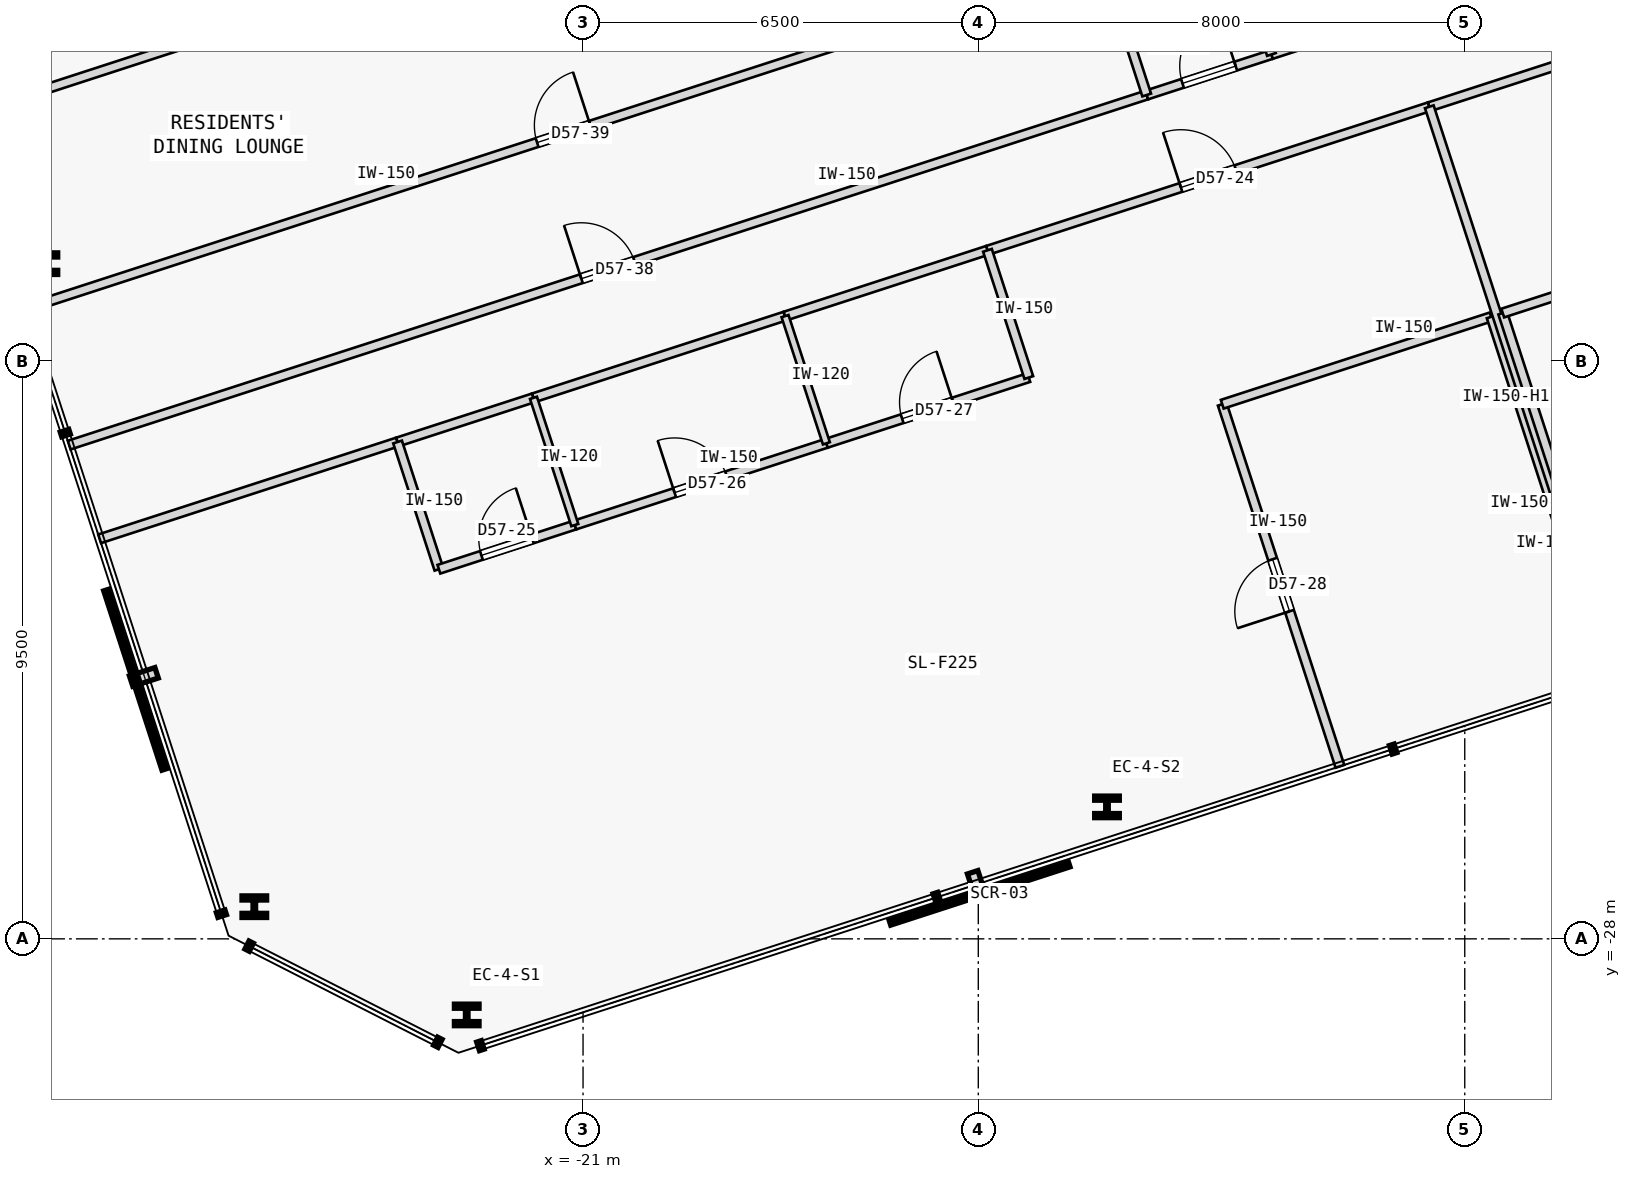
"""IFC4 building model, lengths in metres.
Left out: names, types, materials, properties, quantities, classifications, styles, units other than length and angle.
Written with IfcOpenShell. Run it as: python <this file> out.ifc"""

import sys

from ifc_helpers import new_model, si_unit, direction, frame, frame_2d, origin, origin_2d, place, context, subcontext, project, spatial, rectangle, i_section, extrude, element, fill, save


model = new_model("IFC4")
c1 = context("Model", 3, precision=1e-05, world=origin(), true_north=direction((0.0, 1.0)))
c2 = subcontext(c1, "Body", "Model", "MODEL_VIEW")
j1 = project(units=[si_unit("LENGTHUNIT", "METRE"), si_unit("PLANEANGLEUNIT", "RADIAN")], contexts=[c1])
p1 = place(None, origin())
s1 = spatial("IfcSite", under=j1, at=p1, CompositionType="ELEMENT")
p2 = place(p1, origin())
s2 = spatial("IfcBuilding", under=s1, at=p2, CompositionType="ELEMENT")
p3 = place(p2, frame((0.0, 0.0, 217.6)))
s3 = spatial("IfcBuildingStorey", under=s2, at=p3, CompositionType="ELEMENT", Elevation=217.6)
for number, where, z_axis, x_axis in (
    (1, (-22.913, -29.251, 0.0), (0.0, 0.0, 1.0), (1.0, 0.0, 0.0)),
    (2, (-12.384, -25.83, 0.0), (0.0, 0.0, 1.0), (1.0, 0.0, 0.0)),
    (3, (-29.842, -16.897, 0.0), (0.0, 0.0, 1.0), (1.0, 0.0, 0.0)),
    (4, (-26.406, -27.471, 0.0), (0.0, 0.0, 1.0), (1.0, 0.0, 0.0)),
):
    element("IfcColumn", number, at=place(p3, frame(where, z_axis=z_axis, x_axis=x_axis)), inside=s3, PredefinedType="COLUMN", context=c2, shape_type="SweptSolid", body=[
        extrude(i_section(OverallWidth=0.405, OverallDepth=0.355, WebThickness=0.042, FlangeThickness=0.068, FilletRadius=0.015, at=origin_2d()), origin(), (0.0, 0.0, 1.0), 3.35),
    ])
p4 = place(p3, frame((-28.95, -21.421, 0.0), z_axis=(0.0, 0.0, 1.0), x_axis=(0.951058442388, 0.309011066408, 0.0)))
e5 = element("IfcWall", 5, at=p4, inside=s3, PredefinedType="PARTITIONING", context=c2, shape_type="SweptSolid", body=[
    extrude(rectangle(XDim=5.152, YDim=0.15, at=frame_2d((2.576, 0.0))), origin(), (0.0, 0.0, 1.0), 3.125),
])
p5 = place(p3, frame((-14.349, -16.677, 0.0), z_axis=(0.0, 0.0, 1.0), x_axis=(0.951058958043, 0.309009479345, 0.0)))
e6 = element("IfcWall", 6, at=p5, inside=s3, PredefinedType="PARTITIONING", context=c2, shape_type="SweptSolid", body=[
    extrude(rectangle(XDim=7.64, YDim=0.15, at=frame_2d((3.82, 0.0))), origin(), (0.0, 0.0, 1.0), 3.125),
])
p6 = place(p5, frame((3.345, 0.0, 0.0)))
e7 = element("IfcOpeningElement", 7, at=p6, cuts=e6, PredefinedType="OPENING", context=c2, shape_type="SweptSolid", body=[
    extrude(rectangle(XDim=0.95, YDim=2.15, at=frame_2d((0.475, 1.075))), frame((0.0, 0.085, 0.0), z_axis=(0.0, -1.0, 0.0), x_axis=(1.0, 0.0, 0.0)), (0.0, 0.0, 1.0), 0.17),
])
p7 = place(p3, frame((-24.05, -19.829, 0.0), z_axis=(0.0, 0.0, 1.0), x_axis=(0.951035595692, 0.309081373955, 0.0)))
e8 = element("IfcWall", 8, at=p7, inside=s3, PredefinedType="PARTITIONING", context=c2, shape_type="SweptSolid", body=[
    extrude(rectangle(XDim=2.35, YDim=0.15, at=frame_2d((1.175, 0.0))), origin(), (0.0, 0.0, 1.0), 3.125),
])
p8 = place(p3, frame((-21.815, -19.103, 0.0), z_axis=(0.0, 0.0, 1.0), x_axis=(0.951057987102, 0.309012467661, 0.0)))
e9 = element("IfcWall", 9, at=p8, inside=s3, PredefinedType="PARTITIONING", context=c2, shape_type="SweptSolid", body=[
    extrude(rectangle(XDim=4.35, YDim=0.15, at=frame_2d((2.175, 0.0))), origin(), (0.0, 0.0, 1.0), 3.125),
])
p9 = place(p3, frame((-17.678, -17.759, 0.0), z_axis=(0.0, 0.0, 1.0), x_axis=(0.951055596592, 0.309019824916, 0.0)))
e10 = element("IfcWall", 10, at=p9, inside=s3, PredefinedType="PARTITIONING", context=c2, shape_type="SweptSolid", body=[
    extrude(rectangle(XDim=3.5, YDim=0.15, at=frame_2d((1.75, 0.0))), origin(), (0.0, 0.0, 1.0), 3.125),
])
p10 = place(p3, frame((-7.083, -14.316, 0.0), z_axis=(0.0, 0.0, 1.0), x_axis=(0.951054265246, 0.309023922305, 0.0)))
e11 = element("IfcWall", 11, at=p10, inside=s3, PredefinedType="PARTITIONING", context=c2, shape_type="SweptSolid", body=[
    extrude(rectangle(XDim=4.53, YDim=0.15, at=frame_2d((2.265, 0.0))), origin(), (0.0, 0.0, 1.0), 3.125),
])
p11 = place(p3, frame((-29.45, -19.881, 0.0), z_axis=(0.0, 0.0, 1.0), x_axis=(0.95105650271, 0.309017036186, 0.0)))
e12 = element("IfcWall", 12, at=p11, inside=s3, PredefinedType="PARTITIONING", context=c2, shape_type="SweptSolid", body=[
    extrude(rectangle(XDim=18.632, YDim=0.15, at=frame_2d((9.316, 0.0))), origin(), (0.0, 0.0, 1.0), 3.125),
])
p12 = place(p11, frame((8.856, 0.0, 0.0)))
e13 = element("IfcOpeningElement", 13, at=p12, cuts=e12, PredefinedType="OPENING", context=c2, shape_type="SweptSolid", body=[
    extrude(rectangle(XDim=0.92, YDim=2.15, at=frame_2d((0.46, 1.075))), frame((0.0, 0.085, 0.0), z_axis=(0.0, -1.0, 0.0), x_axis=(1.0, 0.0, 0.0)), (0.0, 0.0, 1.0), 0.17),
])
p13 = place(p3, frame((-11.73, -14.123, 0.0), z_axis=(0.0, 0.0, 1.0), x_axis=(0.951066501686, 0.308986260812, 0.0)))
e14 = element("IfcWall", 14, at=p13, inside=s3, PredefinedType="PARTITIONING", context=c2, shape_type="SweptSolid", body=[
    extrude(rectangle(XDim=2.157, YDim=0.15, at=frame_2d((1.079, 0.0))), origin(), (0.0, 0.0, 1.0), 3.125),
])
p14 = place(p13, frame((0.618, 0.0, 0.0)))
e15 = element("IfcOpeningElement", 15, at=p14, cuts=e14, PredefinedType="OPENING", context=c2, shape_type="SweptSolid", body=[
    extrude(rectangle(XDim=0.92, YDim=2.15, at=frame_2d((0.46, 1.075))), frame((0.0, 0.085, 0.0), z_axis=(0.0, -1.0, 0.0), x_axis=(1.0, 0.0, 0.0)), (0.0, 0.0, 1.0), 0.17),
])
p15 = place(p3, frame((-9.679, -13.457, 0.0), z_axis=(0.0, 0.0, 1.0), x_axis=(0.951054104561, 0.309024416831, 0.0)))
e16 = element("IfcWall", 16, at=p15, inside=s3, PredefinedType="PARTITIONING", context=c2, shape_type="SweptSolid", body=[
    extrude(rectangle(XDim=3.492, YDim=0.15, at=frame_2d((1.746, 0.0))), origin(), (0.0, 0.0, 1.0), 3.125),
])
p16 = place(p15, frame((1.286, 0.0, 0.0)))
e17 = element("IfcOpeningElement", 17, at=p16, cuts=e16, PredefinedType="OPENING", context=c2, shape_type="SweptSolid", body=[
    extrude(rectangle(XDim=0.92, YDim=2.15, at=frame_2d((0.46, 1.075))), frame((0.0, 0.085, 0.0), z_axis=(0.0, -1.0, 0.0), x_axis=(1.0, 0.0, 0.0)), (0.0, 0.0, 1.0), 0.17),
])
p17 = place(p3, frame((-23.37, -21.922, 0.0), z_axis=(0.0, 0.0, 1.0), x_axis=(-0.308960600764, 0.951074837842, 0.0)))
e18 = element("IfcWall", 18, at=p17, inside=s3, PredefinedType="PARTITIONING", context=c2, shape_type="SweptSolid", body=[
    extrude(rectangle(XDim=2.2, YDim=0.15, at=frame_2d((1.1, 0.0))), origin(), (0.0, 0.0, 1.0), 3.125),
])
p18 = place(p3, frame((-23.37, -21.922, 0.0), z_axis=(0.0, 0.0, 1.0), x_axis=(0.951045519245, 0.309050837767, 0.0)))
e19 = element("IfcWall", 19, at=p18, inside=s3, PredefinedType="PARTITIONING", context=c2, shape_type="SweptSolid", body=[
    extrude(rectangle(XDim=2.35, YDim=0.15, at=frame_2d((1.175, 0.0))), origin(), (0.0, 0.0, 1.0), 3.125),
])
p19 = place(p18, frame((0.735, 0.0, 0.0)))
e20 = element("IfcOpeningElement", 20, at=p19, cuts=e19, PredefinedType="OPENING", context=c2, shape_type="SweptSolid", body=[
    extrude(rectangle(XDim=0.88, YDim=2.15, at=frame_2d((0.44, 1.075))), frame((0.0, 0.085, 0.0), z_axis=(0.0, -1.0, 0.0), x_axis=(1.0, 0.0, 0.0)), (0.0, 0.0, 1.0), 0.17),
])
p20 = place(p3, frame((-21.135, -21.195, 0.0), z_axis=(0.0, 0.0, 1.0), x_axis=(0.951069122051, 0.308978195154, 0.0)))
e21 = element("IfcWall", 21, at=p20, inside=s3, PredefinedType="PARTITIONING", context=c2, shape_type="SweptSolid", body=[
    extrude(rectangle(XDim=4.35, YDim=0.15, at=frame_2d((2.175, 0.0))), origin(), (0.0, 0.0, 1.0), 3.125),
])
p21 = place(p20, frame((1.725, 0.0, 0.0)))
e22 = element("IfcOpeningElement", 22, at=p21, cuts=e21, PredefinedType="OPENING", context=c2, shape_type="SweptSolid", body=[
    extrude(rectangle(XDim=0.9, YDim=2.15, at=frame_2d((0.45, 1.075))), frame((0.0, 0.085, 0.0), z_axis=(0.0, -1.0, 0.0), x_axis=(1.0, 0.0, 0.0)), (0.0, 0.0, 1.0), 0.17),
])
p22 = place(p3, frame((-16.998, -19.851, 0.0), z_axis=(0.0, 0.0, 1.0), x_axis=(0.951041757107, 0.309062414796, 0.0)))
e23 = element("IfcWall", 23, at=p22, inside=s3, PredefinedType="PARTITIONING", context=c2, shape_type="SweptSolid", body=[
    extrude(rectangle(XDim=3.5, YDim=0.15, at=frame_2d((1.75, 0.0))), origin(), (0.0, 0.0, 1.0), 3.125),
])
p23 = place(p22, frame((1.31, 0.0, 0.0)))
e24 = element("IfcOpeningElement", 24, at=p23, cuts=e23, PredefinedType="OPENING", context=c2, shape_type="SweptSolid", body=[
    extrude(rectangle(XDim=0.88, YDim=2.15, at=frame_2d((0.44, 1.075))), frame((0.0, 0.085, 0.0), z_axis=(0.0, -1.0, 0.0), x_axis=(1.0, 0.0, 0.0)), (0.0, 0.0, 1.0), 0.17),
])
p24 = place(p3, frame((-13.669, -18.77, 0.0), z_axis=(0.0, 0.0, 1.0), x_axis=(-0.309060979314, 0.951042223598, 0.0)))
e25 = element("IfcWall", 25, at=p24, inside=s3, PredefinedType="PARTITIONING", context=c2, shape_type="SweptSolid", body=[
    extrude(rectangle(XDim=2.2, YDim=0.15, at=frame_2d((1.1, 0.0))), origin(), (0.0, 0.0, 1.0), 3.125),
])
p25 = place(p3, frame((-8.553, -25.164, 0.0), z_axis=(0.0, 0.0, 1.0), x_axis=(-0.309013782848, 0.951057559777, 0.0)))
e26 = element("IfcWall", 26, at=p25, inside=s3, PredefinedType="PARTITIONING", context=c2, shape_type="SweptSolid", body=[
    extrude(rectangle(XDim=6.262, YDim=0.15, at=frame_2d((3.131, 0.0))), origin(), (0.0, 0.0, 1.0), 3.125),
])
p26 = place(p25, frame((2.681, 0.0, 0.0)))
e27 = element("IfcOpeningElement", 27, at=p26, cuts=e26, PredefinedType="OPENING", context=c2, shape_type="SweptSolid", body=[
    extrude(rectangle(XDim=0.9, YDim=2.15, at=frame_2d((0.45, 1.075))), frame((0.0, 0.085, 0.0), z_axis=(0.0, -1.0, 0.0), x_axis=(1.0, 0.0, 0.0)), (0.0, 0.0, 1.0), 0.17),
])
p27 = place(p3, frame((-10.488, -19.208, 0.0), z_axis=(0.0, 0.0, 1.0), x_axis=(0.951050272606, 0.309036209813, 0.0)))
e28 = element("IfcWall", 28, at=p27, inside=s3, PredefinedType="PARTITIONING", context=c2, shape_type="SweptSolid", body=[
    extrude(rectangle(XDim=4.65, YDim=0.15, at=frame_2d((2.325, 0.0))), origin(), (0.0, 0.0, 1.0), 3.125),
])
p28 = place(p3, frame((-4.131, -23.727, 0.0), z_axis=(0.0, 0.0, 1.0), x_axis=(-0.309013782848, 0.951057559777, 0.0)))
e29 = element("IfcWall", 29, at=p28, inside=s3, PredefinedType="PARTITIONING", context=c2, shape_type="SweptSolid", body=[
    extrude(rectangle(XDim=6.262, YDim=0.15, at=frame_2d((3.131, 0.0))), origin(), (0.0, 0.0, 1.0), 2.675),
])
p29 = place(p3, frame((-4.036, -23.696, 0.0), z_axis=(0.0, 0.0, 1.0), x_axis=(-0.309022258842, 0.95105480575, 0.0)))
e30 = element("IfcWall", 30, at=p29, inside=s3, PredefinedType="PARTITIONING", context=c2, shape_type="SweptSolid", body=[
    extrude(rectangle(XDim=9.862, YDim=0.15, at=frame_2d((4.931, 0.0))), origin(), (0.0, 0.0, 1.0), 2.675),
])
p30 = place(p3, frame((-21.135, -21.195, 0.0), z_axis=(0.0, 0.0, 1.0), x_axis=(-0.309060979314, 0.951042223598, 0.0)))
e31 = element("IfcWall", 31, at=p30, inside=s3, PredefinedType="PARTITIONING", context=c2, shape_type="SweptSolid", body=[
    extrude(rectangle(XDim=2.2, YDim=0.12, at=frame_2d((1.1, 0.0))), origin(), (0.0, 0.0, 1.0), 3.125),
])
p31 = place(p3, frame((-16.998, -19.851, 0.0), z_axis=(0.0, 0.0, 1.0), x_axis=(-0.30892799396, 0.951085429679, 0.0)))
e32 = element("IfcWall", 32, at=p31, inside=s3, PredefinedType="PARTITIONING", context=c2, shape_type="SweptSolid", body=[
    extrude(rectangle(XDim=2.2, YDim=0.12, at=frame_2d((1.1, 0.0))), origin(), (0.0, 0.0, 1.0), 3.125),
])
p32 = place(p3, frame((-3.941, -23.665, 0.0), z_axis=(0.0, 0.0, 1.0), x_axis=(-0.309013782848, 0.951057559777, 0.0)))
e33 = element("IfcWall", 33, at=p32, inside=s3, PredefinedType="PARTITIONING", context=c2, shape_type="SweptSolid", body=[
    extrude(rectangle(XDim=6.262, YDim=0.15, at=frame_2d((3.131, 0.0))), origin(), (0.0, 0.0, 1.0), 2.675),
])
p33 = place(p3, frame((-5.876, -17.709, 0.0), z_axis=(0.0, 0.0, 1.0), x_axis=(0.951065702951, 0.308988719326, 0.0)))
e34 = element("IfcWall", 34, at=p33, inside=s3, PredefinedType="PARTITIONING", context=c2, shape_type="SweptSolid", body=[
    extrude(rectangle(XDim=4.65, YDim=0.15, at=frame_2d((2.325, 0.0))), origin(), (0.0, 0.0, 1.0), 3.125),
])
p34 = place(p3, frame((-30.178, -17.642, 0.0), z_axis=(0.0, 0.0, 1.0), x_axis=(0.95105650271, 0.309017036186, 0.0)))
e35 = element("IfcWall", 35, at=p34, inside=s3, PredefinedType="PARTITIONING", context=c2, shape_type="SweptSolid", body=[
    extrude(rectangle(XDim=18.632, YDim=0.15, at=frame_2d((9.316, 0.0))), origin(), (0.0, 0.0, 1.0), 3.125),
])
p35 = place(p34, frame((8.856, 0.0, 0.0)))
e36 = element("IfcOpeningElement", 36, at=p35, cuts=e35, PredefinedType="OPENING", context=c2, shape_type="SweptSolid", body=[
    extrude(rectangle(XDim=0.92, YDim=2.15, at=frame_2d((0.46, 1.075))), frame((0.0, 0.085, 0.0), z_axis=(0.0, -1.0, 0.0), x_axis=(1.0, 0.0, 0.0)), (0.0, 0.0, 1.0), 0.17),
])
p36 = place(p3, frame((-11.73, -14.123, 0.0), z_axis=(0.0, 0.0, 1.0), x_axis=(-0.309062621189, 0.951041690035, 0.0)))
e37 = element("IfcWall", 37, at=p36, inside=s3, PredefinedType="PARTITIONING", context=c2, shape_type="SweptSolid", body=[
    extrude(rectangle(XDim=2.354, YDim=0.15, at=frame_2d((1.177, 0.0))), origin(), (0.0, 0.0, 1.0), 3.125),
])
p37 = place(p3, frame((-31.208, -14.471, 0.0), z_axis=(0.0, 0.0, 1.0), x_axis=(0.951057753948, 0.309013185244, 0.0)))
e38 = element("IfcWall", 38, at=p37, inside=s3, PredefinedType="PARTITIONING", context=c2, shape_type="SweptSolid", body=[
    extrude(rectangle(XDim=18.632, YDim=0.15, at=frame_2d((9.316, 0.0))), origin(), (0.0, 0.0, 1.0), 3.125),
])
p38 = place(p3, frame((-9.679, -13.457, 0.0), z_axis=(0.0, 0.0, 1.0), x_axis=(-0.309010558951, 0.951058607267, 0.0)))
e39 = element("IfcWall", 39, at=p38, inside=s3, PredefinedType="PARTITIONING", context=c2, shape_type="SweptSolid", body=[
    extrude(rectangle(XDim=8.261, YDim=0.15, at=frame_2d((4.13, 0.0))), origin(), (0.0, 0.0, 1.0), 3.125),
])
p39 = place(p6, origin())
e40 = element("IfcDoor", 40, at=p39, inside=s3, OperationType="SINGLE_SWING_LEFT", PredefinedType="DOOR", context=c2, shape_type="SweptSolid", body=[
    extrude(rectangle(XDim=0.95, YDim=2.15, at=frame_2d((0.475, 1.075))), frame((0.0, 0.025, 0.0), z_axis=(0.0, -1.0, 0.0), x_axis=(1.0, 0.0, 0.0)), (0.0, 0.0, 1.0), 0.05),
])
fill(e7, e40)
p40 = place(p19, origin())
e41 = element("IfcDoor", 41, at=p40, inside=s3, OperationType="SINGLE_SWING_RIGHT", PredefinedType="DOOR", context=c2, shape_type="SweptSolid", body=[
    extrude(rectangle(XDim=0.88, YDim=2.15, at=frame_2d((0.44, 1.075))), frame((0.0, 0.025, 0.0), z_axis=(0.0, -1.0, 0.0), x_axis=(1.0, 0.0, 0.0)), (0.0, 0.0, 1.0), 0.05),
])
fill(e20, e41)
p41 = place(p21, origin())
e42 = element("IfcDoor", 42, at=p41, inside=s3, OperationType="SINGLE_SWING_LEFT", PredefinedType="DOOR", context=c2, shape_type="SweptSolid", body=[
    extrude(rectangle(XDim=0.9, YDim=2.15, at=frame_2d((0.45, 1.075))), frame((0.0, 0.025, 0.0), z_axis=(0.0, -1.0, 0.0), x_axis=(1.0, 0.0, 0.0)), (0.0, 0.0, 1.0), 0.05),
])
fill(e22, e42)
p42 = place(p23, origin())
e43 = element("IfcDoor", 43, at=p42, inside=s3, OperationType="SINGLE_SWING_RIGHT", PredefinedType="DOOR", context=c2, shape_type="SweptSolid", body=[
    extrude(rectangle(XDim=0.88, YDim=2.15, at=frame_2d((0.44, 1.075))), frame((0.0, 0.025, 0.0), z_axis=(0.0, -1.0, 0.0), x_axis=(1.0, 0.0, 0.0)), (0.0, 0.0, 1.0), 0.05),
])
fill(e24, e43)
p43 = place(p26, origin())
e44 = element("IfcDoor", 44, at=p43, inside=s3, OperationType="SINGLE_SWING_LEFT", PredefinedType="DOOR", context=c2, shape_type="SweptSolid", body=[
    extrude(rectangle(XDim=0.9, YDim=2.15, at=frame_2d((0.45, 1.075))), frame((0.0, 0.025, 0.0), z_axis=(0.0, -1.0, 0.0), x_axis=(1.0, 0.0, 0.0)), (0.0, 0.0, 1.0), 0.05),
])
fill(e27, e44)
p44 = place(p12, origin())
e45 = element("IfcDoor", 45, at=p44, inside=s3, OperationType="SINGLE_SWING_LEFT", PredefinedType="DOOR", context=c2, shape_type="SweptSolid", body=[
    extrude(rectangle(XDim=0.92, YDim=2.15, at=frame_2d((0.46, 1.075))), frame((0.0, 0.025, 0.0), z_axis=(0.0, -1.0, 0.0), x_axis=(1.0, 0.0, 0.0)), (0.0, 0.0, 1.0), 0.05),
])
fill(e13, e45)
p45 = place(p35, origin())
e46 = element("IfcDoor", 46, at=p45, inside=s3, OperationType="SINGLE_SWING_RIGHT", PredefinedType="DOOR", context=c2, shape_type="SweptSolid", body=[
    extrude(rectangle(XDim=0.92, YDim=2.15, at=frame_2d((0.46, 1.075))), frame((0.0, 0.025, 0.0), z_axis=(0.0, -1.0, 0.0), x_axis=(1.0, 0.0, 0.0)), (0.0, 0.0, 1.0), 0.05),
])
fill(e36, e46)
p46 = place(p14, origin())
e47 = element("IfcDoor", 47, at=p46, inside=s3, OperationType="SINGLE_SWING_RIGHT", PredefinedType="DOOR", context=c2, shape_type="SweptSolid", body=[
    extrude(rectangle(XDim=0.92, YDim=2.15, at=frame_2d((0.46, 1.075))), frame((0.0, 0.025, 0.0), z_axis=(0.0, -1.0, 0.0), x_axis=(1.0, 0.0, 0.0)), (0.0, 0.0, 1.0), 0.05),
])
fill(e15, e47)
save(model, sys.argv[1])
